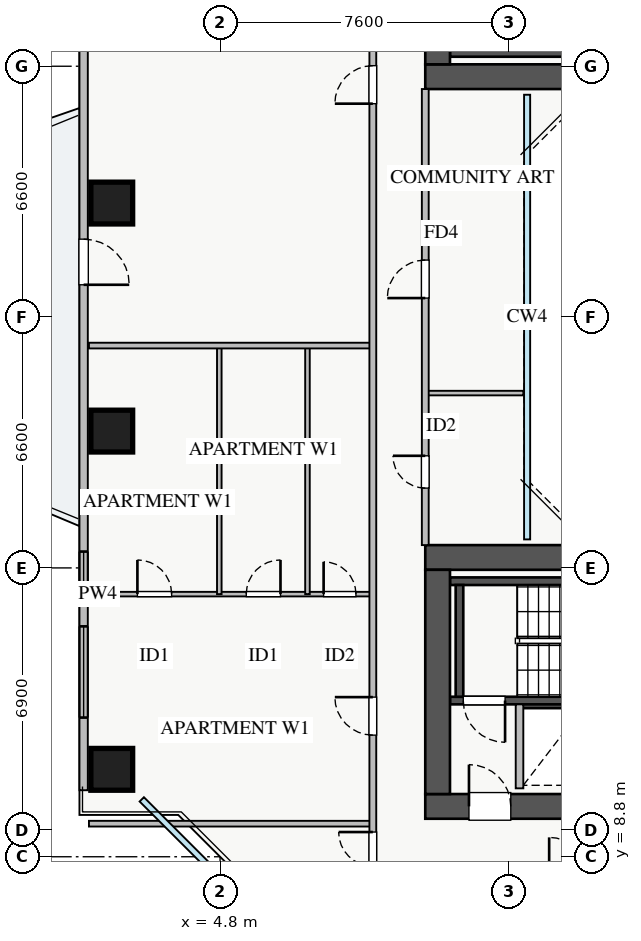
"""IFC4 building model, lengths in metres.
Left out: names, types, materials, properties, quantities, classifications, styles, units other than length and angle.
Written with IfcOpenShell. Run it as: python <this file> out.ifc"""

import sys

from ifc_helpers import new_model, si_unit, direction, frame, frame_2d, origin, origin_2d, place, context, subcontext, project, spatial, rectangle, extrude, source, transform, mapped, element, fill, save


model = new_model("IFC4")
c1 = context("Model", 3, precision=1e-05, world=origin(), true_north=direction((0.0, 1.0)))
c2 = subcontext(c1, "Body", "Model", "MODEL_VIEW")
j1 = project(units=[si_unit("LENGTHUNIT", "METRE"), si_unit("PLANEANGLEUNIT", "RADIAN")], contexts=[c1])
p1 = place(None, origin())
s1 = spatial("IfcSite", under=j1, at=p1, CompositionType="ELEMENT")
p2 = place(p1, origin())
s2 = spatial("IfcBuilding", under=s1, at=p2, CompositionType="ELEMENT")
p3 = place(p2, frame((0.0, 0.0, 100.25)))
s3 = spatial("IfcBuildingStorey", under=s2, at=p3, CompositionType="ELEMENT", Elevation=100.25)
p4 = place(p3, frame((12.68, 12.8, 0.0), z_axis=(0.0, 0.0, 1.0), x_axis=(1.0, 0.0, 0.0)))
e1 = element("IfcWall", 1, at=p4, inside=s3, PredefinedType="SHEAR", context=c2, shape_type="SweptSolid", body=[
    extrude(rectangle(XDim=1.94, YDim=0.18, at=frame_2d((0.97, 0.0))), origin(), (0.0, 0.0, 1.0), 3.07),
])
p5 = place(p3, frame((10.85, 29.95, 0.0), z_axis=(0.0, 0.0, 1.0), x_axis=(1.0, 0.0, 0.0)))
e2 = element("IfcWall", 2, at=p5, inside=s3, PredefinedType="SHEAR", context=c2, shape_type="SweptSolid", body=[
    extrude(rectangle(XDim=7.3, YDim=0.2, at=frame_2d((3.65, 0.0))), origin(), (0.0, 0.0, 1.0), 3.25),
])
p6 = place(p3, frame((10.85, 12.91, 0.0), z_axis=(0.0, 0.0, 1.0), x_axis=(1.0, 0.0, 0.0)))
e3 = element("IfcWall", 3, at=p6, inside=s3, PredefinedType="SHEAR", context=c2, shape_type="SweptSolid", body=[
    extrude(rectangle(XDim=7.3, YDim=0.2, at=frame_2d((3.65, 0.0))), origin(), (0.0, 0.0, 1.0), 3.25),
])
p7 = place(p6, frame((0.35, 0.0, 0.0)))
e4 = element("IfcOpeningElement", 4, at=p7, cuts=e3, PredefinedType="OPENING", context=c2, shape_type="SweptSolid", body=[
    extrude(rectangle(XDim=1.1, YDim=2.05, at=frame_2d((0.55, 1.025))), frame((0.0, 0.11, 0.0), z_axis=(0.0, -1.0, 0.0), x_axis=(1.0, 0.0, 0.0)), (0.0, 0.0, 1.0), 0.22),
])
p8 = place(p3, frame((10.85, 16.05, 0.0), z_axis=(0.0, 0.0, 1.0), x_axis=(1.0, 0.0, 0.0)))
e5 = element("IfcWall", 5, at=p8, inside=s3, PredefinedType="SHEAR", context=c2, shape_type="SweptSolid", body=[
    extrude(rectangle(XDim=7.3, YDim=0.2, at=frame_2d((3.65, 0.0))), origin(), (0.0, 0.0, 1.0), 3.25),
])
p9 = place(p3, frame((11.1, 13.01, 0.0), z_axis=(0.0, 0.0, 1.0), x_axis=(0.0, 1.0, 0.0)))
e6 = element("IfcWall", 6, at=p9, inside=s3, PredefinedType="SHEAR", context=c2, shape_type="SweptSolid", body=[
    extrude(rectangle(XDim=2.94, YDim=0.2, at=frame_2d((1.47, 0.0))), origin(), (0.0, 0.0, 1.0), 3.25),
])
p10 = place(p3, frame((10.2, 29.325, 0.0), z_axis=(0.0, 0.0, 1.0), x_axis=(1.0, 0.0, 0.0)))
e7 = element("IfcWall", 7, at=p10, inside=s3, PredefinedType="SHEAR", context=c2, shape_type="SweptSolid", body=[
    extrude(rectangle(XDim=17.6, YDim=0.65, at=frame_2d((8.8, 0.0))), origin(), (0.0, 0.0, 1.0), 3.25),
])
p11 = place(p3, frame((10.525, 29.65, 0.0), z_axis=(0.0, 0.0, 1.0), x_axis=(0.0, 1.0, 0.0)))
e8 = element("IfcWall", 8, at=p11, inside=s3, PredefinedType="SHEAR", context=c2, shape_type="SweptSolid", body=[
    extrude(rectangle(XDim=5.9, YDim=0.65, at=frame_2d((2.95, 0.0))), origin(), (0.0, 0.0, 1.0), 3.25),
])
p12 = place(p3, frame((10.2, 10.125, 0.0), z_axis=(0.0, 0.0, 1.0), x_axis=(1.0, 0.0, 0.0)))
e9 = element("IfcWall", 9, at=p12, inside=s3, PredefinedType="SHEAR", context=c2, shape_type="SweptSolid", body=[
    extrude(rectangle(XDim=17.6, YDim=0.65, at=frame_2d((8.8, 0.0))), origin(), (0.0, 0.0, 1.0), 3.25),
])
p13 = place(p12, frame((1.15, 0.0, 0.0)))
e10 = element("IfcOpeningElement", 10, at=p13, cuts=e9, PredefinedType="OPENING", context=c2, shape_type="SweptSolid", body=[
    extrude(rectangle(XDim=1.1, YDim=2.05, at=frame_2d((0.55, 1.025))), frame((0.0, 0.335, 0.0), z_axis=(0.0, -1.0, 0.0), x_axis=(1.0, 0.0, 0.0)), (0.0, 0.0, 1.0), 0.67),
])
p14 = place(p12, frame((8.3, 0.0, 0.0)))
e11 = element("IfcOpeningElement", 11, at=p14, cuts=e9, PredefinedType="OPENING", context=c2, shape_type="SweptSolid", body=[
    extrude(rectangle(XDim=1.1, YDim=2.05, at=frame_2d((0.55, 1.025))), frame((0.0, 0.335, 0.0), z_axis=(0.0, -1.0, 0.0), x_axis=(1.0, 0.0, 0.0)), (0.0, 0.0, 1.0), 0.67),
])
p15 = place(p12, frame((4.9, 0.0, 0.0)))
e12 = element("IfcOpeningElement", 12, at=p15, cuts=e9, PredefinedType="OPENING", context=c2, shape_type="SweptSolid", body=[
    extrude(rectangle(XDim=1.1, YDim=2.05, at=frame_2d((0.55, 1.025))), frame((0.0, 0.335, 0.0), z_axis=(0.0, -1.0, 0.0), x_axis=(1.0, 0.0, 0.0)), (0.0, 0.0, 1.0), 0.67),
])
p16 = place(p12, frame((14.74, 0.0, 0.0)))
e13 = element("IfcOpeningElement", 13, at=p16, cuts=e9, PredefinedType="OPENING", context=c2, shape_type="SweptSolid", body=[
    extrude(rectangle(XDim=1.0, YDim=2.05, at=frame_2d((0.5, 1.025))), frame((0.0, 0.335, 0.0), z_axis=(0.0, -1.0, 0.0), x_axis=(1.0, 0.0, 0.0)), (0.0, 0.0, 1.0), 0.67),
])
p17 = place(p12, frame((10.64, 0.0, 0.0)))
e14 = element("IfcOpeningElement", 14, at=p17, cuts=e9, PredefinedType="OPENING", context=c2, shape_type="SweptSolid", body=[
    extrude(rectangle(XDim=1.0, YDim=2.05, at=frame_2d((0.5, 1.025))), frame((0.0, 0.335, 0.0), z_axis=(0.0, -1.0, 0.0), x_axis=(1.0, 0.0, 0.0)), (0.0, 0.0, 1.0), 0.67),
])
p18 = place(p12, frame((13.09, 0.0, 0.0)))
e15 = element("IfcOpeningElement", 15, at=p18, cuts=e9, PredefinedType="OPENING", context=c2, shape_type="SweptSolid", body=[
    extrude(rectangle(XDim=1.0, YDim=2.05, at=frame_2d((0.5, 1.025))), frame((0.0, 0.335, 0.0), z_axis=(0.0, -1.0, 0.0), x_axis=(1.0, 0.0, 0.0)), (0.0, 0.0, 1.0), 0.67),
])
p19 = place(p3, frame((10.2, 16.675, 0.0), z_axis=(0.0, 0.0, 1.0), x_axis=(1.0, 0.0, 0.0)))
e16 = element("IfcWall", 16, at=p19, inside=s3, PredefinedType="SHEAR", context=c2, shape_type="SweptSolid", body=[
    extrude(rectangle(XDim=17.6, YDim=0.65, at=frame_2d((8.8, 0.0))), origin(), (0.0, 0.0, 1.0), 3.25),
])
p20 = place(p3, frame((10.525, 10.45, 0.0), z_axis=(0.0, 0.0, 1.0), x_axis=(0.0, 1.0, 0.0)))
e17 = element("IfcWall", 17, at=p20, inside=s3, PredefinedType="SHEAR", context=c2, shape_type="SweptSolid", body=[
    extrude(rectangle(XDim=5.9, YDim=0.65, at=frame_2d((2.95, 0.0))), origin(), (0.0, 0.0, 1.0), 3.25),
])
m1 = source(origin(), c2, "Body", "SweptSolid", [
    extrude(rectangle(XDim=1.1, YDim=1.1, at=origin_2d()), origin(), (0.0, 0.0, 1.0), 3.25),
])
for number, where, z_axis, x_axis in (
    (18, (1.95, 26.0, 0.0), (0.0, 0.0, 1.0), (1.0, 0.0, 0.0)),
    (19, (1.95, 20.0, 0.0), (0.0, 0.0, 1.0), (1.0, 0.0, 0.0)),
    (20, (1.95, 11.1, 0.0), (0.0, 0.0, 1.0), (1.0, 0.0, 0.0)),
):
    element("IfcColumn", number, at=place(p3, frame(where, z_axis=z_axis, x_axis=x_axis)), inside=s3, PredefinedType="COLUMN", context=c2, shape_type="MappedRepresentation", body=[
        mapped(m1, transform((0.0, 0.0, 0.0), x_axis=(1.0, 0.0, 0.0), y_axis=(0.0, 1.0, 0.0), z_axis=(0.0, 0.0, 1.0), scale=1.0)),
    ])
p21 = place(p3, frame((1.21, 10.55, 0.0), z_axis=(0.0, 0.0, 1.0), x_axis=(0.0, 1.0, 0.0)))
e21 = element("IfcWall", 21, at=p21, inside=s3, PredefinedType="STANDARD", context=c2, shape_type="SweptSolid", body=[
    extrude(rectangle(XDim=24.9, YDim=0.22, at=frame_2d((12.45, 0.0))), origin(), (0.0, 0.0, 1.0), 2.61),
])
p22 = place(p21, frame((13.3, 0.0, 0.0)))
e22 = element("IfcOpeningElement", 22, at=p22, cuts=e21, PredefinedType="OPENING", context=c2, shape_type="SweptSolid", body=[
    extrude(rectangle(XDim=1.2, YDim=2.1, at=frame_2d((0.6, 1.05))), frame((0.0, 0.12, 0.0), z_axis=(0.0, -1.0, 0.0), x_axis=(1.0, 0.0, 0.0)), (0.0, 0.0, 1.0), 0.24),
])
p23 = place(p21, frame((1.912, 0.0, 0.9)))
e23 = element("IfcOpeningElement", 23, at=p23, cuts=e21, PredefinedType="OPENING", context=c2, shape_type="SweptSolid", body=[
    extrude(rectangle(XDim=2.4, YDim=1.48, at=frame_2d((1.2, 0.74))), frame((0.0, 0.12, 0.0), z_axis=(0.0, -1.0, 0.0), x_axis=(1.0, 0.0, 0.0)), (0.0, 0.0, 1.0), 0.24),
])
p24 = place(p21, frame((20.737, 0.0, 0.9)))
e24 = element("IfcOpeningElement", 24, at=p24, cuts=e21, PredefinedType="OPENING", context=c2, shape_type="SweptSolid", body=[
    extrude(rectangle(XDim=2.1, YDim=1.48, at=frame_2d((1.05, 0.74))), frame((0.0, 0.12, 0.0), z_axis=(0.0, -1.0, 0.0), x_axis=(1.0, 0.0, 0.0)), (0.0, 0.0, 1.0), 0.24),
])
p25 = place(p21, frame((5.38, 0.0, 0.9)))
e25 = element("IfcOpeningElement", 25, at=p25, cuts=e21, PredefinedType="OPENING", context=c2, shape_type="SweptSolid", body=[
    extrude(rectangle(XDim=0.9, YDim=1.2, at=frame_2d((0.45, 0.6))), frame((0.0, 0.12, 0.0), z_axis=(0.0, -1.0, 0.0), x_axis=(1.0, 0.0, 0.0)), (0.0, 0.0, 1.0), 0.24),
])
p26 = place(p3, frame((12.68, 10.6, 0.0), z_axis=(0.0, 0.0, 1.0), x_axis=(0.0, 1.0, 0.0)))
e26 = element("IfcWall", 26, at=p26, inside=s3, PredefinedType="PARTITIONING", context=c2, shape_type="SweptSolid", body=[
    extrude(rectangle(XDim=2.21, YDim=0.2, at=frame_2d((1.105, 0.0))), origin(), (0.0, 0.0, 1.0), 3.07),
])
p27 = place(p3, frame((1.35, 9.67, 0.0), z_axis=(0.0, 0.0, 1.0), x_axis=(1.0, 0.0, 0.0)))
e27 = element("IfcWall", 27, at=p27, inside=s3, PredefinedType="PARTITIONING", context=c2, shape_type="SweptSolid", body=[
    extrude(rectangle(XDim=7.47, YDim=0.15, at=frame_2d((3.735, 0.0))), origin(), (0.0, 0.0, 1.0), 3.07),
])
p28 = place(p3, frame((1.35, 15.71, 0.0), z_axis=(0.0, 0.0, 1.0), x_axis=(1.0, 0.0, 0.0)))
e28 = element("IfcWall", 28, at=p28, inside=s3, PredefinedType="PLUMBINGWALL", context=c2, shape_type="SweptSolid", body=[
    extrude(rectangle(XDim=7.47, YDim=0.12, at=frame_2d((3.735, 0.0))), origin(), (0.0, 0.0, 1.0), 3.07),
])
p29 = place(p28, frame((1.275, 0.0, 0.0)))
e29 = element("IfcOpeningElement", 29, at=p29, cuts=e28, PredefinedType="OPENING", context=c2, shape_type="SweptSolid", body=[
    extrude(rectangle(XDim=0.9, YDim=2.05, at=frame_2d((0.45, 1.025))), frame((0.0, 0.07, 0.0), z_axis=(0.0, -1.0, 0.0), x_axis=(1.0, 0.0, 0.0)), (0.0, 0.0, 1.0), 0.14),
])
p30 = place(p28, frame((4.14, 0.0, 0.0)))
e30 = element("IfcOpeningElement", 30, at=p30, cuts=e28, PredefinedType="OPENING", context=c2, shape_type="SweptSolid", body=[
    extrude(rectangle(XDim=0.9, YDim=2.05, at=frame_2d((0.45, 1.025))), frame((0.0, 0.07, 0.0), z_axis=(0.0, -1.0, 0.0), x_axis=(1.0, 0.0, 0.0)), (0.0, 0.0, 1.0), 0.14),
])
p31 = place(p28, frame((6.175, 0.0, 0.0)))
e31 = element("IfcOpeningElement", 31, at=p31, cuts=e28, PredefinedType="OPENING", context=c2, shape_type="SweptSolid", body=[
    extrude(rectangle(XDim=0.85, YDim=2.05, at=frame_2d((0.425, 1.025))), frame((0.0, 0.07, 0.0), z_axis=(0.0, -1.0, 0.0), x_axis=(1.0, 0.0, 0.0)), (0.0, 0.0, 1.0), 0.14),
])
for number, where, z_axis, x_axis in (
    (32, (4.78, 15.71, 0.0), (0.0, 0.0, 1.0), (0.0, 1.0, 0.0)),
    (33, (7.1, 15.71, 0.0), (0.0, 0.0, 1.0), (0.0, 1.0, 0.0)),
):
    element("IfcWall", number, at=place(p3, frame(where, z_axis=z_axis, x_axis=x_axis)), inside=s3, PredefinedType="PLUMBINGWALL", context=c2, shape_type="SweptSolid", body=[
        extrude(rectangle(XDim=6.54, YDim=0.12, at=frame_2d((3.27, 0.0))), origin(), (0.0, 0.0, 1.0), 3.07),
    ])
p32 = place(p3, frame((1.35, 22.25, 0.0), z_axis=(0.0, 0.0, 1.0), x_axis=(1.0, 0.0, 0.0)))
e34 = element("IfcWall", 34, at=p32, inside=s3, PredefinedType="PARTITIONING", context=c2, shape_type="SweptSolid", body=[
    extrude(rectangle(XDim=7.47, YDim=0.15, at=frame_2d((3.735, 0.0))), origin(), (0.0, 0.0, 1.0), 3.07),
])
p33 = place(p3, frame((8.82, 8.31, 0.0), z_axis=(0.0, 0.0, 1.0), x_axis=(0.0, 1.0, 0.0)))
e35 = element("IfcWall", 35, at=p33, inside=s3, PredefinedType="PARTITIONING", context=c2, shape_type="SweptSolid", body=[
    extrude(rectangle(XDim=29.13, YDim=0.18, at=frame_2d((14.565, 0.0))), origin(), (0.0, 0.0, 1.0), 3.07),
])
p34 = place(p33, frame((27.94, 0.0, 0.0)))
e36 = element("IfcOpeningElement", 36, at=p34, cuts=e35, PredefinedType="OPENING", context=c2, shape_type="SweptSolid", body=[
    extrude(rectangle(XDim=0.9, YDim=2.05, at=frame_2d((0.45, 1.025))), frame((0.0, 0.1, 0.0), z_axis=(0.0, -1.0, 0.0), x_axis=(1.0, 0.0, 0.0)), (0.0, 0.0, 1.0), 0.2),
])
p35 = place(p33, frame((0.24, 0.0, 0.0)))
e37 = element("IfcOpeningElement", 37, at=p35, cuts=e35, PredefinedType="OPENING", context=c2, shape_type="SweptSolid", body=[
    extrude(rectangle(XDim=0.9, YDim=2.05, at=frame_2d((0.45, 1.025))), frame((0.0, 0.1, 0.0), z_axis=(0.0, -1.0, 0.0), x_axis=(1.0, 0.0, 0.0)), (0.0, 0.0, 1.0), 0.2),
])
p36 = place(p33, frame((3.69, 0.0, 0.0)))
e38 = element("IfcOpeningElement", 38, at=p36, cuts=e35, PredefinedType="OPENING", context=c2, shape_type="SweptSolid", body=[
    extrude(rectangle(XDim=1.0, YDim=2.05, at=frame_2d((0.5, 1.025))), frame((0.0, 0.1, 0.0), z_axis=(0.0, -1.0, 0.0), x_axis=(1.0, 0.0, 0.0)), (0.0, 0.0, 1.0), 0.2),
])
p37 = place(p33, frame((20.305, 0.0, 0.0)))
e39 = element("IfcOpeningElement", 39, at=p37, cuts=e35, PredefinedType="OPENING", context=c2, shape_type="SweptSolid", body=[
    extrude(rectangle(XDim=1.0, YDim=2.05, at=frame_2d((0.5, 1.025))), frame((0.0, 0.1, 0.0), z_axis=(0.0, -1.0, 0.0), x_axis=(1.0, 0.0, 0.0)), (0.0, 0.0, 1.0), 0.2),
])
p38 = place(p3, frame((10.2, 21.0, 0.0), z_axis=(0.0, 0.0, 1.0), x_axis=(1.0, 0.0, 0.0)))
e40 = element("IfcWall", 40, at=p38, inside=s3, PredefinedType="PLUMBINGWALL", context=c2, shape_type="SweptSolid", body=[
    extrude(rectangle(XDim=2.58, YDim=0.12, at=frame_2d((1.29, 0.0))), origin(), (0.0, 0.0, 1.0), 3.07),
])
p39 = place(p3, frame((10.2, 17.0, 0.0), z_axis=(0.0, 0.0, 1.0), x_axis=(0.0, 1.0, 0.0)))
e41 = element("IfcWall", 41, at=p39, inside=s3, PredefinedType="PARTITIONING", context=c2, shape_type="SweptSolid", body=[
    extrude(rectangle(XDim=12.0, YDim=0.18, at=frame_2d((6.0, 0.0))), origin(), (0.0, 0.0, 1.0), 3.07),
])
p40 = place(p39, frame((1.5, 0.0, 0.0)))
e42 = element("IfcOpeningElement", 42, at=p40, cuts=e41, PredefinedType="OPENING", context=c2, shape_type="SweptSolid", body=[
    extrude(rectangle(XDim=0.85, YDim=2.05, at=frame_2d((0.425, 1.025))), frame((0.0, 0.1, 0.0), z_axis=(0.0, -1.0, 0.0), x_axis=(1.0, 0.0, 0.0)), (0.0, 0.0, 1.0), 0.2),
])
p41 = place(p39, frame((6.5, 0.0, 0.0)))
e43 = element("IfcOpeningElement", 43, at=p41, cuts=e41, PredefinedType="OPENING", context=c2, shape_type="SweptSolid", body=[
    extrude(rectangle(XDim=1.0, YDim=2.05, at=frame_2d((0.5, 1.025))), frame((0.0, 0.1, 0.0), z_axis=(0.0, -1.0, 0.0), x_axis=(1.0, 0.0, 0.0)), (0.0, 0.0, 1.0), 0.2),
])
m2 = source(origin(), c2, "Body", "SweptSolid", [
    extrude(rectangle(XDim=1.2, YDim=2.1, at=frame_2d((0.6, 1.05))), frame((0.0, 0.025, 0.0), z_axis=(0.0, -1.0, 0.0), x_axis=(1.0, 0.0, 0.0)), (0.0, 0.0, 1.0), 0.05),
])
p42 = place(p22, frame((1.2, 0.0, 0.0), z_axis=(0.0, 0.0, 1.0), x_axis=(-1.0, 0.0, 0.0)))
e44 = element("IfcDoor", 44, at=p42, inside=s3, OperationType="SINGLE_SWING_LEFT", PredefinedType="DOOR", context=c2, shape_type="MappedRepresentation", body=[
    mapped(m2, transform((0.0, 0.0, 0.0), x_axis=(1.0, 0.0, 0.0), y_axis=(0.0, 1.0, 0.0), z_axis=(0.0, 0.0, 1.0), scale=1.0)),
])
fill(e22, e44)
m3 = source(origin(), c2, "Body", "SweptSolid", [
    extrude(rectangle(XDim=2.4, YDim=1.48, at=frame_2d((1.2, 0.74))), frame((0.0, 0.03, 0.0), z_axis=(0.0, -1.0, 0.0), x_axis=(1.0, 0.0, 0.0)), (0.0, 0.0, 1.0), 0.06),
])
p43 = place(p23, origin())
e45 = element("IfcWindow", 45, at=p43, inside=s3, PartitioningType="TRIPLE_PANEL_VERTICAL", PredefinedType="WINDOW", context=c2, shape_type="MappedRepresentation", body=[
    mapped(m3, transform((0.0, 0.0, 0.0), x_axis=(1.0, 0.0, 0.0), y_axis=(0.0, 1.0, 0.0), z_axis=(0.0, 0.0, 1.0), scale=1.0)),
])
fill(e23, e45)
m4 = source(origin(), c2, "Body", "SweptSolid", [
    extrude(rectangle(XDim=1.1, YDim=2.05, at=frame_2d((0.55, 1.025))), frame((0.0, 0.025, 0.0), z_axis=(0.0, -1.0, 0.0), x_axis=(1.0, 0.0, 0.0)), (0.0, 0.0, 1.0), 0.05),
])
p44 = place(p13, origin())
e46 = element("IfcDoor", 46, at=p44, inside=s3, OperationType="SINGLE_SWING_LEFT", PredefinedType="DOOR", context=c2, shape_type="MappedRepresentation", body=[
    mapped(m4, transform((0.0, 0.0, 0.0), x_axis=(1.0, 0.0, 0.0), y_axis=(0.0, 1.0, 0.0), z_axis=(0.0, 0.0, 1.0), scale=1.0)),
])
fill(e10, e46)
p45 = place(p7, frame((1.1, 0.0, 0.0), z_axis=(0.0, 0.0, 1.0), x_axis=(-1.0, 0.0, 0.0)))
e47 = element("IfcDoor", 47, at=p45, inside=s3, OperationType="SINGLE_SWING_RIGHT", PredefinedType="DOOR", context=c2, shape_type="MappedRepresentation", body=[
    mapped(m4, transform((0.0, 0.0, 0.0), x_axis=(1.0, 0.0, 0.0), y_axis=(0.0, 1.0, 0.0), z_axis=(0.0, 0.0, 1.0), scale=1.0)),
])
fill(e4, e47)
m5 = source(origin(), c2, "Body", "SweptSolid", [
    extrude(rectangle(XDim=0.9, YDim=2.05, at=frame_2d((0.45, 1.025))), frame((0.0, 0.025, 0.0), z_axis=(0.0, -1.0, 0.0), x_axis=(1.0, 0.0, 0.0)), (0.0, 0.0, 1.0), 0.05),
])
p46 = place(p29, origin())
e48 = element("IfcDoor", 48, at=p46, inside=s3, OperationType="SINGLE_SWING_LEFT", PredefinedType="DOOR", context=c2, shape_type="MappedRepresentation", body=[
    mapped(m5, transform((0.0, 0.0, 0.0), x_axis=(1.0, 0.0, 0.0), y_axis=(0.0, 1.0, 0.0), z_axis=(0.0, 0.0, 1.0), scale=1.0)),
])
fill(e29, e48)
p47 = place(p30, origin())
e49 = element("IfcDoor", 49, at=p47, inside=s3, OperationType="SINGLE_SWING_RIGHT", PredefinedType="DOOR", context=c2, shape_type="MappedRepresentation", body=[
    mapped(m5, transform((0.0, 0.0, 0.0), x_axis=(1.0, 0.0, 0.0), y_axis=(0.0, 1.0, 0.0), z_axis=(0.0, 0.0, 1.0), scale=1.0)),
])
fill(e30, e49)
m6 = source(origin(), c2, "Body", "SweptSolid", [
    extrude(rectangle(XDim=0.85, YDim=2.05, at=frame_2d((0.425, 1.025))), frame((0.0, 0.025, 0.0), z_axis=(0.0, -1.0, 0.0), x_axis=(1.0, 0.0, 0.0)), (0.0, 0.0, 1.0), 0.05),
])
p48 = place(p31, origin())
e50 = element("IfcDoor", 50, at=p48, inside=s3, OperationType="SINGLE_SWING_LEFT", PredefinedType="DOOR", context=c2, shape_type="MappedRepresentation", body=[
    mapped(m6, transform((0.0, 0.0, 0.0), x_axis=(1.0, 0.0, 0.0), y_axis=(0.0, 1.0, 0.0), z_axis=(0.0, 0.0, 1.0), scale=1.0)),
])
fill(e31, e50)
p49 = place(p35, origin())
e51 = element("IfcDoor", 51, at=p49, inside=s3, OperationType="SINGLE_SWING_RIGHT", PredefinedType="DOOR", context=c2, shape_type="MappedRepresentation", body=[
    mapped(m5, transform((0.0, 0.0, 0.0), x_axis=(1.0, 0.0, 0.0), y_axis=(0.0, 1.0, 0.0), z_axis=(0.0, 0.0, 1.0), scale=1.0)),
])
fill(e37, e51)
m7 = source(origin(), c2, "Body", "SweptSolid", [
    extrude(rectangle(XDim=1.0, YDim=2.05, at=frame_2d((0.5, 1.025))), frame((0.0, 0.025, 0.0), z_axis=(0.0, -1.0, 0.0), x_axis=(1.0, 0.0, 0.0)), (0.0, 0.0, 1.0), 0.05),
])
p50 = place(p36, origin())
e52 = element("IfcDoor", 52, at=p50, inside=s3, OperationType="SINGLE_SWING_RIGHT", PredefinedType="DOOR", context=c2, shape_type="MappedRepresentation", body=[
    mapped(m7, transform((0.0, 0.0, 0.0), x_axis=(1.0, 0.0, 0.0), y_axis=(0.0, 1.0, 0.0), z_axis=(0.0, 0.0, 1.0), scale=1.0)),
])
fill(e38, e52)
p51 = place(p37, origin())
e53 = element("IfcDoor", 53, at=p51, inside=s3, OperationType="SINGLE_SWING_LEFT", PredefinedType="DOOR", context=c2, shape_type="MappedRepresentation", body=[
    mapped(m7, transform((0.0, 0.0, 0.0), x_axis=(1.0, 0.0, 0.0), y_axis=(0.0, 1.0, 0.0), z_axis=(0.0, 0.0, 1.0), scale=1.0)),
])
fill(e39, e53)
p52 = place(p40, origin())
e54 = element("IfcDoor", 54, at=p52, inside=s3, OperationType="SINGLE_SWING_RIGHT", PredefinedType="DOOR", context=c2, shape_type="MappedRepresentation", body=[
    mapped(m6, transform((0.0, 0.0, 0.0), x_axis=(1.0, 0.0, 0.0), y_axis=(0.0, 1.0, 0.0), z_axis=(0.0, 0.0, 1.0), scale=1.0)),
])
fill(e42, e54)
p53 = place(p41, origin())
e55 = element("IfcDoor", 55, at=p53, inside=s3, OperationType="SINGLE_SWING_LEFT", PredefinedType="DOOR", context=c2, shape_type="MappedRepresentation", body=[
    mapped(m7, transform((0.0, 0.0, 0.0), x_axis=(1.0, 0.0, 0.0), y_axis=(0.0, 1.0, 0.0), z_axis=(0.0, 0.0, 1.0), scale=1.0)),
])
fill(e43, e55)
m8 = source(origin(), c2, "Body", "SweptSolid", [
    extrude(rectangle(XDim=0.9, YDim=1.2, at=frame_2d((0.45, 0.6))), frame((0.0, 0.03, 0.0), z_axis=(0.0, -1.0, 0.0), x_axis=(1.0, 0.0, 0.0)), (0.0, 0.0, 1.0), 0.06),
])
p54 = place(p25, origin())
e56 = element("IfcWindow", 56, at=p54, inside=s3, PartitioningType="SINGLE_PANEL", PredefinedType="WINDOW", context=c2, shape_type="MappedRepresentation", body=[
    mapped(m8, transform((0.0, 0.0, 0.0), x_axis=(1.0, 0.0, 0.0), y_axis=(0.0, 1.0, 0.0), z_axis=(0.0, 0.0, 1.0), scale=1.0)),
])
fill(e25, e56)
save(model, sys.argv[1])
